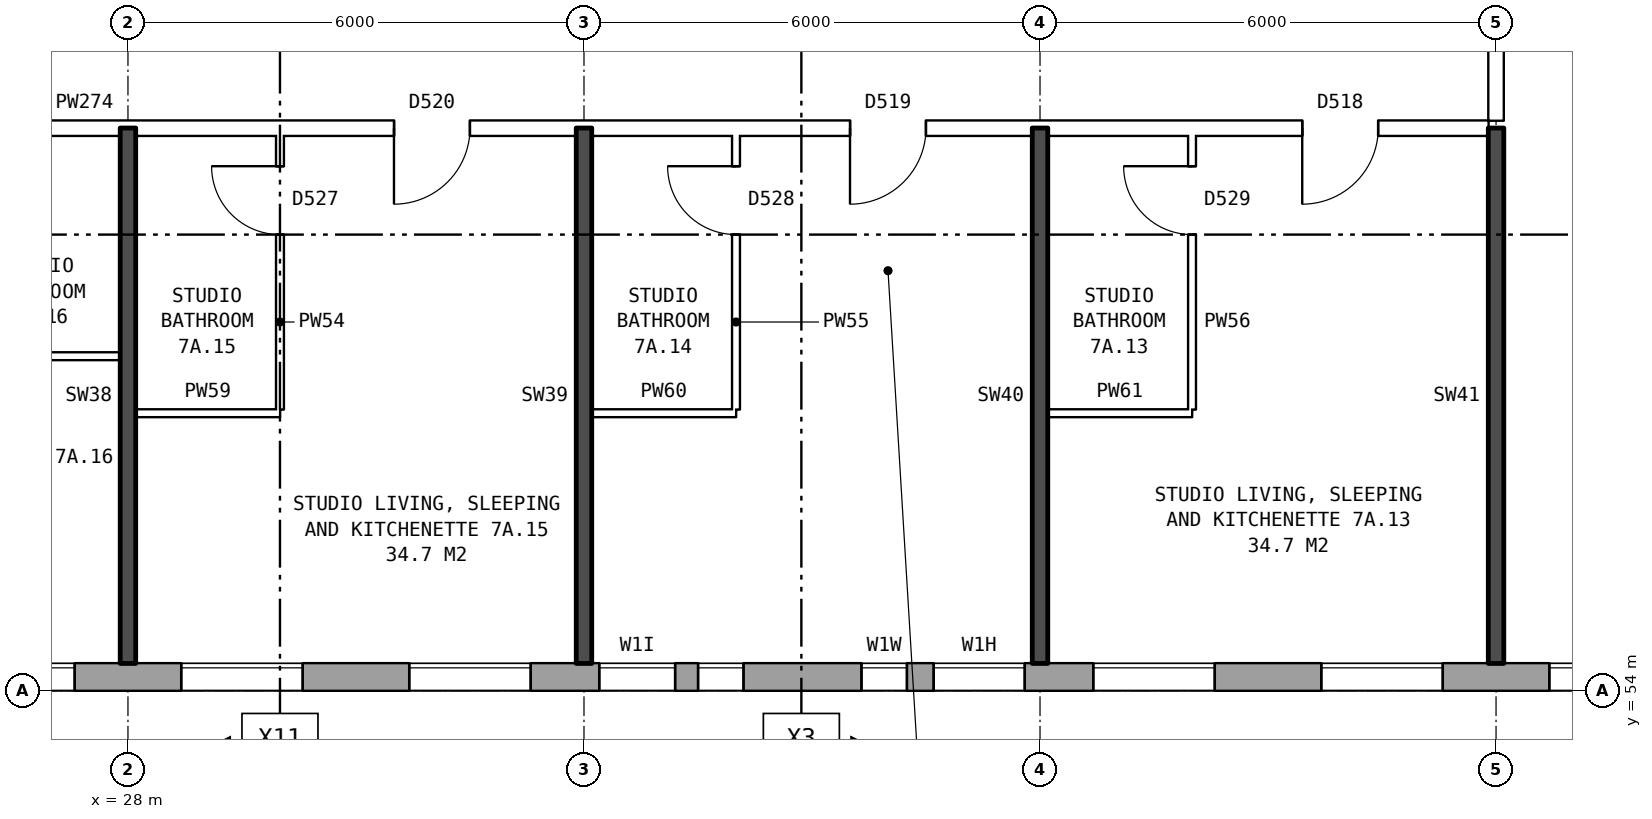
"""IFC4 building model, lengths in metres.
Left out: names, types, materials, properties, quantities, classifications, styles, units other than length and angle.
Written with IfcOpenShell. Run it as: python <this file> out.ifc"""

import sys

from ifc_helpers import new_model, si_unit, direction, frame, frame_2d, origin, place, context, subcontext, project, spatial, rectangle, extrude, element, fill, save


model = new_model("IFC4")
c1 = context("Model", 3, precision=1e-05, world=origin(), true_north=direction((0.0, 1.0)))
c2 = subcontext(c1, "Body", "Model", "MODEL_VIEW")
j1 = project(units=[si_unit("LENGTHUNIT", "METRE"), si_unit("PLANEANGLEUNIT", "RADIAN")], contexts=[c1])
p1 = place(None, origin())
s1 = spatial("IfcSite", under=j1, at=p1, CompositionType="ELEMENT")
p2 = place(p1, origin())
s2 = spatial("IfcBuilding", under=s1, at=p2, CompositionType="ELEMENT")
p3 = place(p2, frame((0.0, 0.0, 28.8)))
s3 = spatial("IfcBuildingStorey", under=s2, at=p3, CompositionType="ELEMENT", Elevation=28.8)
p4 = place(p3, frame((22.825, 54.18, 0.0), z_axis=(0.0, 0.0, 1.0), x_axis=(1.0, 0.0, 0.0)))
e1 = element("IfcWall", 1, at=p4, inside=s3, PredefinedType="STANDARD", context=c2, shape_type="SweptSolid", body=[
    extrude(rectangle(XDim=50.101, YDim=0.36, at=frame_2d((25.05, 0.0))), origin(), (0.0, 0.0, 1.0), 2.85),
])
p5 = place(p4, frame((2.875, 0.0, 0.8)))
e2 = element("IfcOpeningElement", 2, at=p5, cuts=e1, PredefinedType="OPENING", context=c2, shape_type="SweptSolid", body=[
    extrude(rectangle(XDim=1.6, YDim=1.8, at=frame_2d((0.8, 0.9))), frame((0.0, 0.19, 0.0), z_axis=(0.0, -1.0, 0.0), x_axis=(1.0, 0.0, 0.0)), (0.0, 0.0, 1.0), 0.38),
])
p6 = place(p4, frame((5.875, 0.0, 0.8)))
e3 = element("IfcOpeningElement", 3, at=p6, cuts=e1, PredefinedType="OPENING", context=c2, shape_type="SweptSolid", body=[
    extrude(rectangle(XDim=1.6, YDim=1.8, at=frame_2d((0.8, 0.9))), frame((0.0, 0.19, 0.0), z_axis=(0.0, -1.0, 0.0), x_axis=(1.0, 0.0, 0.0)), (0.0, 0.0, 1.0), 0.38),
])
p7 = place(p4, frame((8.875, 0.0, 0.8)))
e4 = element("IfcOpeningElement", 4, at=p7, cuts=e1, PredefinedType="OPENING", context=c2, shape_type="SweptSolid", body=[
    extrude(rectangle(XDim=1.6, YDim=1.8, at=frame_2d((0.8, 0.9))), frame((0.0, 0.19, 0.0), z_axis=(0.0, -1.0, 0.0), x_axis=(1.0, 0.0, 0.0)), (0.0, 0.0, 1.0), 0.38),
])
p8 = place(p4, frame((11.375, 0.0, 1.0)))
e5 = element("IfcOpeningElement", 5, at=p8, cuts=e1, PredefinedType="OPENING", context=c2, shape_type="SweptSolid", body=[
    extrude(rectangle(XDim=1.0, YDim=1.5, at=frame_2d((0.5, 0.75))), frame((0.0, 0.19, 0.0), z_axis=(0.0, -1.0, 0.0), x_axis=(1.0, 0.0, 0.0)), (0.0, 0.0, 1.0), 0.38),
])
p9 = place(p4, frame((12.675, 0.0, 1.6)))
e6 = element("IfcOpeningElement", 6, at=p9, cuts=e1, PredefinedType="OPENING", context=c2, shape_type="SweptSolid", body=[
    extrude(rectangle(XDim=0.6, YDim=0.9, at=frame_2d((0.3, 0.45))), frame((0.0, 0.19, 0.0), z_axis=(0.0, -1.0, 0.0), x_axis=(1.0, 0.0, 0.0)), (0.0, 0.0, 1.0), 0.38),
])
p10 = place(p4, frame((17.875, 0.0, 0.8)))
e7 = element("IfcOpeningElement", 7, at=p10, cuts=e1, PredefinedType="OPENING", context=c2, shape_type="SweptSolid", body=[
    extrude(rectangle(XDim=1.6, YDim=1.8, at=frame_2d((0.8, 0.9))), frame((0.0, 0.19, 0.0), z_axis=(0.0, -1.0, 0.0), x_axis=(1.0, 0.0, 0.0)), (0.0, 0.0, 1.0), 0.38),
])
p11 = place(p4, frame((20.875, 0.0, 0.8)))
e8 = element("IfcOpeningElement", 8, at=p11, cuts=e1, PredefinedType="OPENING", context=c2, shape_type="SweptSolid", body=[
    extrude(rectangle(XDim=1.6, YDim=1.8, at=frame_2d((0.8, 0.9))), frame((0.0, 0.19, 0.0), z_axis=(0.0, -1.0, 0.0), x_axis=(1.0, 0.0, 0.0)), (0.0, 0.0, 1.0), 0.38),
])
p12 = place(p4, frame((23.875, 0.0, 0.8)))
e9 = element("IfcOpeningElement", 9, at=p12, cuts=e1, PredefinedType="OPENING", context=c2, shape_type="SweptSolid", body=[
    extrude(rectangle(XDim=1.6, YDim=1.8, at=frame_2d((0.8, 0.9))), frame((0.0, 0.19, 0.0), z_axis=(0.0, -1.0, 0.0), x_axis=(1.0, 0.0, 0.0)), (0.0, 0.0, 1.0), 0.38),
])
p13 = place(p4, frame((26.875, 0.0, 0.8)))
e10 = element("IfcOpeningElement", 10, at=p13, cuts=e1, PredefinedType="OPENING", context=c2, shape_type="SweptSolid", body=[
    extrude(rectangle(XDim=1.6, YDim=1.8, at=frame_2d((0.8, 0.9))), frame((0.0, 0.19, 0.0), z_axis=(0.0, -1.0, 0.0), x_axis=(1.0, 0.0, 0.0)), (0.0, 0.0, 1.0), 0.38),
])
p14 = place(p4, frame((29.875, 0.0, 0.8)))
e11 = element("IfcOpeningElement", 11, at=p14, cuts=e1, PredefinedType="OPENING", context=c2, shape_type="SweptSolid", body=[
    extrude(rectangle(XDim=1.6, YDim=1.8, at=frame_2d((0.8, 0.9))), frame((0.0, 0.19, 0.0), z_axis=(0.0, -1.0, 0.0), x_axis=(1.0, 0.0, 0.0)), (0.0, 0.0, 1.0), 0.38),
])
p15 = place(p4, frame((32.375, 0.0, 0.8)))
e12 = element("IfcOpeningElement", 12, at=p15, cuts=e1, PredefinedType="OPENING", context=c2, shape_type="SweptSolid", body=[
    extrude(rectangle(XDim=1.4, YDim=1.8, at=frame_2d((0.7, 0.9))), frame((0.0, 0.19, 0.0), z_axis=(0.0, -1.0, 0.0), x_axis=(1.0, 0.0, 0.0)), (0.0, 0.0, 1.0), 0.38),
])
p16 = place(p4, frame((35.375, 0.0, 0.15)))
e13 = element("IfcOpeningElement", 13, at=p16, cuts=e1, PredefinedType="OPENING", context=c2, shape_type="SweptSolid", body=[
    extrude(rectangle(XDim=0.8, YDim=0.9, at=frame_2d((0.4, 0.45))), frame((0.0, 0.19, 0.0), z_axis=(0.0, -1.0, 0.0), x_axis=(1.0, 0.0, 0.0)), (0.0, 0.0, 1.0), 0.38),
])
p17 = place(p4, frame((38.875, 0.0, 0.8)))
e14 = element("IfcOpeningElement", 14, at=p17, cuts=e1, PredefinedType="OPENING", context=c2, shape_type="SweptSolid", body=[
    extrude(rectangle(XDim=1.6, YDim=1.8, at=frame_2d((0.8, 0.9))), frame((0.0, 0.19, 0.0), z_axis=(0.0, -1.0, 0.0), x_axis=(1.0, 0.0, 0.0)), (0.0, 0.0, 1.0), 0.38),
])
p18 = place(p4, frame((41.875, 0.0, 0.8)))
e15 = element("IfcOpeningElement", 15, at=p18, cuts=e1, PredefinedType="OPENING", context=c2, shape_type="SweptSolid", body=[
    extrude(rectangle(XDim=1.6, YDim=1.8, at=frame_2d((0.8, 0.9))), frame((0.0, 0.19, 0.0), z_axis=(0.0, -1.0, 0.0), x_axis=(1.0, 0.0, 0.0)), (0.0, 0.0, 1.0), 0.38),
])
p19 = place(p4, frame((44.875, 0.0, 0.8)))
e16 = element("IfcOpeningElement", 16, at=p19, cuts=e1, PredefinedType="OPENING", context=c2, shape_type="SweptSolid", body=[
    extrude(rectangle(XDim=1.6, YDim=1.8, at=frame_2d((0.8, 0.9))), frame((0.0, 0.19, 0.0), z_axis=(0.0, -1.0, 0.0), x_axis=(1.0, 0.0, 0.0)), (0.0, 0.0, 1.0), 0.38),
])
p20 = place(p4, frame((47.875, 0.0, 0.8)))
e17 = element("IfcOpeningElement", 17, at=p20, cuts=e1, PredefinedType="OPENING", context=c2, shape_type="SweptSolid", body=[
    extrude(rectangle(XDim=1.6, YDim=1.8, at=frame_2d((0.8, 0.9))), frame((0.0, 0.19, 0.0), z_axis=(0.0, -1.0, 0.0), x_axis=(1.0, 0.0, 0.0)), (0.0, 0.0, 1.0), 0.38),
])
p21 = place(p4, frame((14.825, 0.0, 0.8)))
e18 = element("IfcOpeningElement", 18, at=p21, cuts=e1, PredefinedType="OPENING", context=c2, shape_type="SweptSolid", body=[
    extrude(rectangle(XDim=0.6, YDim=0.9, at=frame_2d((0.3, 0.45))), frame((0.0, 0.19, 0.0), z_axis=(0.0, -1.0, 0.0), x_axis=(1.0, 0.0, 0.0)), (0.0, 0.0, 1.0), 0.38),
])
p22 = place(p4, frame((15.775, 0.0, 0.8)))
e19 = element("IfcOpeningElement", 19, at=p22, cuts=e1, PredefinedType="OPENING", context=c2, shape_type="SweptSolid", body=[
    extrude(rectangle(XDim=1.2, YDim=1.5, at=frame_2d((0.6, 0.75))), frame((0.0, 0.19, 0.0), z_axis=(0.0, -1.0, 0.0), x_axis=(1.0, 0.0, 0.0)), (0.0, 0.0, 1.0), 0.38),
])
p23 = place(p4, frame((34.075, 0.0, 0.8)))
e20 = element("IfcOpeningElement", 20, at=p23, cuts=e1, PredefinedType="OPENING", context=c2, shape_type="SweptSolid", body=[
    extrude(rectangle(XDim=0.6, YDim=1.2, at=frame_2d((0.3, 0.6))), frame((0.0, 0.19, 0.0), z_axis=(0.0, -1.0, 0.0), x_axis=(1.0, 0.0, 0.0)), (0.0, 0.0, 1.0), 0.38),
])
p24 = place(p4, frame((36.725, 0.0, 1.65)))
e21 = element("IfcOpeningElement", 21, at=p24, cuts=e1, PredefinedType="OPENING", context=c2, shape_type="SweptSolid", body=[
    extrude(rectangle(XDim=1.2, YDim=0.9, at=frame_2d((0.6, 0.45))), frame((0.0, 0.19, 0.0), z_axis=(0.0, -1.0, 0.0), x_axis=(1.0, 0.0, 0.0)), (0.0, 0.0, 1.0), 0.38),
])
for number, where, z_axis, x_axis in (
    (22, (28.1, 57.65, 0.0), (0.0, 0.0, 1.0), (1.0, 0.0, 0.0)),
    (23, (34.1, 57.65, 0.0), (0.0, 0.0, 1.0), (1.0, 0.0, 0.0)),
    (24, (40.1, 57.65, 0.0), (0.0, 0.0, 1.0), (1.0, 0.0, 0.0)),
):
    element("IfcWall", number, at=place(p3, frame(where, z_axis=z_axis, x_axis=x_axis)), inside=s3, PredefinedType="PARTITIONING", context=c2, shape_type="SweptSolid", body=[
        extrude(rectangle(XDim=1.9, YDim=0.1, at=frame_2d((0.95, 0.0))), origin(), (0.0, 0.0, 1.0), 2.85),
    ])
p25 = place(p3, frame((25.6, 58.4, 0.0), z_axis=(0.0, 0.0, 1.0), x_axis=(1.0, 0.0, 0.0)))
e25 = element("IfcWall", 25, at=p25, inside=s3, PredefinedType="PARTITIONING", context=c2, shape_type="SweptSolid", body=[
    extrude(rectangle(XDim=2.3, YDim=0.1, at=frame_2d((1.15, 0.0))), origin(), (0.0, 0.0, 1.0), 2.85),
])
p26 = place(p3, frame((20.11, 61.4, 0.0), z_axis=(0.0, 0.0, 1.0), x_axis=(1.0, 0.0, 0.0)))
e26 = element("IfcWall", 26, at=p26, inside=s3, PredefinedType="PARTITIONING", context=c2, shape_type="SweptSolid", body=[
    extrude(rectangle(XDim=25.79, YDim=0.2, at=frame_2d((12.895, 0.0))), origin(), (0.0, 0.0, 1.0), 2.85),
])
p27 = place(p26, frame((23.34, 0.0, 0.0)))
e27 = element("IfcOpeningElement", 27, at=p27, cuts=e26, PredefinedType="OPENING", context=c2, shape_type="SweptSolid", body=[
    extrude(rectangle(XDim=1.0, YDim=2.1, at=frame_2d((0.5, 1.05))), frame((0.0, 0.11, 0.0), z_axis=(0.0, -1.0, 0.0), x_axis=(1.0, 0.0, 0.0)), (0.0, 0.0, 1.0), 0.22),
])
p28 = place(p26, frame((17.39, 0.0, 0.0)))
e28 = element("IfcOpeningElement", 28, at=p28, cuts=e26, PredefinedType="OPENING", context=c2, shape_type="SweptSolid", body=[
    extrude(rectangle(XDim=1.0, YDim=2.1, at=frame_2d((0.5, 1.05))), frame((0.0, 0.11, 0.0), z_axis=(0.0, -1.0, 0.0), x_axis=(1.0, 0.0, 0.0)), (0.0, 0.0, 1.0), 0.22),
])
p29 = place(p26, frame((11.39, 0.0, 0.0)))
e29 = element("IfcOpeningElement", 29, at=p29, cuts=e26, PredefinedType="OPENING", context=c2, shape_type="SweptSolid", body=[
    extrude(rectangle(XDim=1.0, YDim=2.1, at=frame_2d((0.5, 1.05))), frame((0.0, 0.11, 0.0), z_axis=(0.0, -1.0, 0.0), x_axis=(1.0, 0.0, 0.0)), (0.0, 0.0, 1.0), 0.22),
])
p30 = place(p26, frame((2.245, 0.0, 0.0)))
e30 = element("IfcOpeningElement", 30, at=p30, cuts=e26, PredefinedType="OPENING", context=c2, shape_type="SweptSolid", body=[
    extrude(rectangle(XDim=1.0, YDim=2.1, at=frame_2d((0.5, 1.05))), frame((0.0, 0.11, 0.0), z_axis=(0.0, -1.0, 0.0), x_axis=(1.0, 0.0, 0.0)), (0.0, 0.0, 1.0), 0.22),
])
p31 = place(p3, frame((28.0, 54.36, 0.0), z_axis=(0.0, 0.0, 1.0), x_axis=(0.0, 1.0, 0.0)))
e31 = element("IfcWall", 31, at=p31, inside=s3, PredefinedType="SOLIDWALL", context=c2, shape_type="SweptSolid", body=[
    extrude(rectangle(XDim=7.04, YDim=0.2, at=frame_2d((3.52, 0.0))), origin(), (0.0, 0.0, 1.0), 2.85),
])
p32 = place(p3, frame((30.0, 57.7, 0.0), z_axis=(0.0, 0.0, 1.0), x_axis=(0.0, 1.0, 0.0)))
e32 = element("IfcWall", 32, at=p32, inside=s3, PredefinedType="PARTITIONING", context=c2, shape_type="SweptSolid", body=[
    extrude(rectangle(XDim=3.6, YDim=0.1, at=frame_2d((1.8, 0.0))), origin(), (0.0, 0.0, 1.0), 2.85),
])
p33 = place(p32, frame((2.3, 0.0, 0.0)))
e33 = element("IfcOpeningElement", 33, at=p33, cuts=e32, PredefinedType="OPENING", context=c2, shape_type="SweptSolid", body=[
    extrude(rectangle(XDim=0.9, YDim=2.1, at=frame_2d((0.45, 1.05))), frame((0.0, 0.06, 0.0), z_axis=(0.0, -1.0, 0.0), x_axis=(1.0, 0.0, 0.0)), (0.0, 0.0, 1.0), 0.12),
])
p34 = place(p3, frame((34.0, 54.36, 0.0), z_axis=(0.0, 0.0, 1.0), x_axis=(0.0, 1.0, 0.0)))
e34 = element("IfcWall", 34, at=p34, inside=s3, PredefinedType="SOLIDWALL", context=c2, shape_type="SweptSolid", body=[
    extrude(rectangle(XDim=7.04, YDim=0.2, at=frame_2d((3.52, 0.0))), origin(), (0.0, 0.0, 1.0), 2.85),
])
p35 = place(p3, frame((36.0, 57.7, 0.0), z_axis=(0.0, 0.0, 1.0), x_axis=(0.0, 1.0, 0.0)))
e35 = element("IfcWall", 35, at=p35, inside=s3, PredefinedType="PARTITIONING", context=c2, shape_type="SweptSolid", body=[
    extrude(rectangle(XDim=3.6, YDim=0.1, at=frame_2d((1.8, 0.0))), origin(), (0.0, 0.0, 1.0), 2.85),
])
p36 = place(p35, frame((2.3, 0.0, 0.0)))
e36 = element("IfcOpeningElement", 36, at=p36, cuts=e35, PredefinedType="OPENING", context=c2, shape_type="SweptSolid", body=[
    extrude(rectangle(XDim=0.9, YDim=2.1, at=frame_2d((0.45, 1.05))), frame((0.0, 0.06, 0.0), z_axis=(0.0, -1.0, 0.0), x_axis=(1.0, 0.0, 0.0)), (0.0, 0.0, 1.0), 0.12),
])
p37 = place(p3, frame((40.0, 54.36, 0.0), z_axis=(0.0, 0.0, 1.0), x_axis=(0.0, 1.0, 0.0)))
e37 = element("IfcWall", 37, at=p37, inside=s3, PredefinedType="SOLIDWALL", context=c2, shape_type="SweptSolid", body=[
    extrude(rectangle(XDim=7.04, YDim=0.2, at=frame_2d((3.52, 0.0))), origin(), (0.0, 0.0, 1.0), 2.85),
])
p38 = place(p3, frame((42.0, 57.7, 0.0), z_axis=(0.0, 0.0, 1.0), x_axis=(0.0, 1.0, 0.0)))
e38 = element("IfcWall", 38, at=p38, inside=s3, PredefinedType="PARTITIONING", context=c2, shape_type="SweptSolid", body=[
    extrude(rectangle(XDim=3.6, YDim=0.1, at=frame_2d((1.8, 0.0))), origin(), (0.0, 0.0, 1.0), 2.85),
])
p39 = place(p38, frame((2.3, 0.0, 0.0)))
e39 = element("IfcOpeningElement", 39, at=p39, cuts=e38, PredefinedType="OPENING", context=c2, shape_type="SweptSolid", body=[
    extrude(rectangle(XDim=0.9, YDim=2.1, at=frame_2d((0.45, 1.05))), frame((0.0, 0.06, 0.0), z_axis=(0.0, -1.0, 0.0), x_axis=(1.0, 0.0, 0.0)), (0.0, 0.0, 1.0), 0.12),
])
p40 = place(p3, frame((46.0, 54.36, 0.0), z_axis=(0.0, 0.0, 1.0), x_axis=(0.0, 1.0, 0.0)))
e40 = element("IfcWall", 40, at=p40, inside=s3, PredefinedType="SOLIDWALL", context=c2, shape_type="SweptSolid", body=[
    extrude(rectangle(XDim=7.04, YDim=0.2, at=frame_2d((3.52, 0.0))), origin(), (0.0, 0.0, 1.0), 2.85),
])
p41 = place(p3, frame((46.0, 61.5, 0.0), z_axis=(0.0, 0.0, 1.0), x_axis=(0.0, 1.0, 0.0)))
e41 = element("IfcWall", 41, at=p41, inside=s3, PredefinedType="PARTITIONING", context=c2, shape_type="SweptSolid", body=[
    extrude(rectangle(XDim=2.2, YDim=0.2, at=frame_2d((1.1, 0.0))), origin(), (0.0, 0.0, 1.0), 2.85),
])
p42 = place(p5, origin())
e42 = element("IfcWindow", 42, at=p42, inside=s3, PartitioningType="SINGLE_PANEL", PredefinedType="WINDOW", context=c2, shape_type="SweptSolid", body=[
    extrude(rectangle(XDim=1.6, YDim=1.8, at=frame_2d((0.8, 0.9))), frame((0.0, 0.15, 0.0), z_axis=(0.0, -1.0, 0.0), x_axis=(1.0, 0.0, 0.0)), (0.0, 0.0, 1.0), 0.06),
])
fill(e2, e42)
p43 = place(p6, origin())
e43 = element("IfcWindow", 43, at=p43, inside=s3, PartitioningType="SINGLE_PANEL", PredefinedType="WINDOW", context=c2, shape_type="SweptSolid", body=[
    extrude(rectangle(XDim=1.6, YDim=1.8, at=frame_2d((0.8, 0.9))), frame((0.0, 0.15, 0.0), z_axis=(0.0, -1.0, 0.0), x_axis=(1.0, 0.0, 0.0)), (0.0, 0.0, 1.0), 0.06),
])
fill(e3, e43)
p44 = place(p7, origin())
e44 = element("IfcWindow", 44, at=p44, inside=s3, PartitioningType="SINGLE_PANEL", PredefinedType="WINDOW", context=c2, shape_type="SweptSolid", body=[
    extrude(rectangle(XDim=1.6, YDim=1.8, at=frame_2d((0.8, 0.9))), frame((0.0, 0.15, 0.0), z_axis=(0.0, -1.0, 0.0), x_axis=(1.0, 0.0, 0.0)), (0.0, 0.0, 1.0), 0.06),
])
fill(e4, e44)
p45 = place(p8, origin())
e45 = element("IfcWindow", 45, at=p45, inside=s3, PartitioningType="SINGLE_PANEL", PredefinedType="WINDOW", context=c2, shape_type="SweptSolid", body=[
    extrude(rectangle(XDim=1.0, YDim=1.5, at=frame_2d((0.5, 0.75))), frame((0.0, 0.15, 0.0), z_axis=(0.0, -1.0, 0.0), x_axis=(1.0, 0.0, 0.0)), (0.0, 0.0, 1.0), 0.06),
])
fill(e5, e45)
p46 = place(p9, origin())
e46 = element("IfcWindow", 46, at=p46, inside=s3, PartitioningType="SINGLE_PANEL", PredefinedType="WINDOW", context=c2, shape_type="SweptSolid", body=[
    extrude(rectangle(XDim=0.6, YDim=0.9, at=frame_2d((0.3, 0.45))), frame((0.0, 0.15, 0.0), z_axis=(0.0, -1.0, 0.0), x_axis=(1.0, 0.0, 0.0)), (0.0, 0.0, 1.0), 0.06),
])
fill(e6, e46)
p47 = place(p10, origin())
e47 = element("IfcWindow", 47, at=p47, inside=s3, PartitioningType="SINGLE_PANEL", PredefinedType="WINDOW", context=c2, shape_type="SweptSolid", body=[
    extrude(rectangle(XDim=1.6, YDim=1.8, at=frame_2d((0.8, 0.9))), frame((0.0, 0.15, 0.0), z_axis=(0.0, -1.0, 0.0), x_axis=(1.0, 0.0, 0.0)), (0.0, 0.0, 1.0), 0.06),
])
fill(e7, e47)
p48 = place(p11, origin())
e48 = element("IfcWindow", 48, at=p48, inside=s3, PartitioningType="SINGLE_PANEL", PredefinedType="WINDOW", context=c2, shape_type="SweptSolid", body=[
    extrude(rectangle(XDim=1.6, YDim=1.8, at=frame_2d((0.8, 0.9))), frame((0.0, 0.15, 0.0), z_axis=(0.0, -1.0, 0.0), x_axis=(1.0, 0.0, 0.0)), (0.0, 0.0, 1.0), 0.06),
])
fill(e8, e48)
p49 = place(p12, origin())
e49 = element("IfcWindow", 49, at=p49, inside=s3, PartitioningType="SINGLE_PANEL", PredefinedType="WINDOW", context=c2, shape_type="SweptSolid", body=[
    extrude(rectangle(XDim=1.6, YDim=1.8, at=frame_2d((0.8, 0.9))), frame((0.0, 0.15, 0.0), z_axis=(0.0, -1.0, 0.0), x_axis=(1.0, 0.0, 0.0)), (0.0, 0.0, 1.0), 0.06),
])
fill(e9, e49)
p50 = place(p27, frame((1.0, 0.0, 0.0), z_axis=(0.0, 0.0, 1.0), x_axis=(-1.0, 0.0, 0.0)))
e50 = element("IfcDoor", 50, at=p50, inside=s3, OperationType="SINGLE_SWING_RIGHT", PredefinedType="DOOR", context=c2, shape_type="SweptSolid", body=[
    extrude(rectangle(XDim=1.0, YDim=2.1, at=frame_2d((0.5, 1.05))), frame((0.0, 0.025, 0.0), z_axis=(0.0, -1.0, 0.0), x_axis=(1.0, 0.0, 0.0)), (0.0, 0.0, 1.0), 0.05),
])
fill(e27, e50)
p51 = place(p39, origin())
e51 = element("IfcDoor", 51, at=p51, inside=s3, OperationType="SINGLE_SWING_RIGHT", PredefinedType="DOOR", context=c2, shape_type="SweptSolid", body=[
    extrude(rectangle(XDim=0.9, YDim=2.1, at=frame_2d((0.45, 1.05))), frame((0.0, 0.025, 0.0), z_axis=(0.0, -1.0, 0.0), x_axis=(1.0, 0.0, 0.0)), (0.0, 0.0, 1.0), 0.05),
])
fill(e39, e51)
p52 = place(p28, frame((1.0, 0.0, 0.0), z_axis=(0.0, 0.0, 1.0), x_axis=(-1.0, 0.0, 0.0)))
e52 = element("IfcDoor", 52, at=p52, inside=s3, OperationType="SINGLE_SWING_RIGHT", PredefinedType="DOOR", context=c2, shape_type="SweptSolid", body=[
    extrude(rectangle(XDim=1.0, YDim=2.1, at=frame_2d((0.5, 1.05))), frame((0.0, 0.025, 0.0), z_axis=(0.0, -1.0, 0.0), x_axis=(1.0, 0.0, 0.0)), (0.0, 0.0, 1.0), 0.05),
])
fill(e28, e52)
p53 = place(p36, origin())
e53 = element("IfcDoor", 53, at=p53, inside=s3, OperationType="SINGLE_SWING_RIGHT", PredefinedType="DOOR", context=c2, shape_type="SweptSolid", body=[
    extrude(rectangle(XDim=0.9, YDim=2.1, at=frame_2d((0.45, 1.05))), frame((0.0, 0.025, 0.0), z_axis=(0.0, -1.0, 0.0), x_axis=(1.0, 0.0, 0.0)), (0.0, 0.0, 1.0), 0.05),
])
fill(e36, e53)
p54 = place(p29, frame((1.0, 0.0, 0.0), z_axis=(0.0, 0.0, 1.0), x_axis=(-1.0, 0.0, 0.0)))
e54 = element("IfcDoor", 54, at=p54, inside=s3, OperationType="SINGLE_SWING_RIGHT", PredefinedType="DOOR", context=c2, shape_type="SweptSolid", body=[
    extrude(rectangle(XDim=1.0, YDim=2.1, at=frame_2d((0.5, 1.05))), frame((0.0, 0.025, 0.0), z_axis=(0.0, -1.0, 0.0), x_axis=(1.0, 0.0, 0.0)), (0.0, 0.0, 1.0), 0.05),
])
fill(e29, e54)
p55 = place(p33, origin())
e55 = element("IfcDoor", 55, at=p55, inside=s3, OperationType="SINGLE_SWING_RIGHT", PredefinedType="DOOR", context=c2, shape_type="SweptSolid", body=[
    extrude(rectangle(XDim=0.9, YDim=2.1, at=frame_2d((0.45, 1.05))), frame((0.0, 0.025, 0.0), z_axis=(0.0, -1.0, 0.0), x_axis=(1.0, 0.0, 0.0)), (0.0, 0.0, 1.0), 0.05),
])
fill(e33, e55)
p56 = place(p21, origin())
e56 = element("IfcWindow", 56, at=p56, inside=s3, PartitioningType="SINGLE_PANEL", PredefinedType="WINDOW", context=c2, shape_type="SweptSolid", body=[
    extrude(rectangle(XDim=0.6, YDim=0.9, at=frame_2d((0.3, 0.45))), frame((0.0, 0.15, 0.0), z_axis=(0.0, -1.0, 0.0), x_axis=(1.0, 0.0, 0.0)), (0.0, 0.0, 1.0), 0.06),
])
fill(e18, e56)
p57 = place(p22, origin())
e57 = element("IfcWindow", 57, at=p57, inside=s3, PartitioningType="SINGLE_PANEL", PredefinedType="WINDOW", context=c2, shape_type="SweptSolid", body=[
    extrude(rectangle(XDim=1.2, YDim=1.5, at=frame_2d((0.6, 0.75))), frame((0.0, 0.15, 0.0), z_axis=(0.0, -1.0, 0.0), x_axis=(1.0, 0.0, 0.0)), (0.0, 0.0, 1.0), 0.06),
])
fill(e19, e57)
save(model, sys.argv[1])
